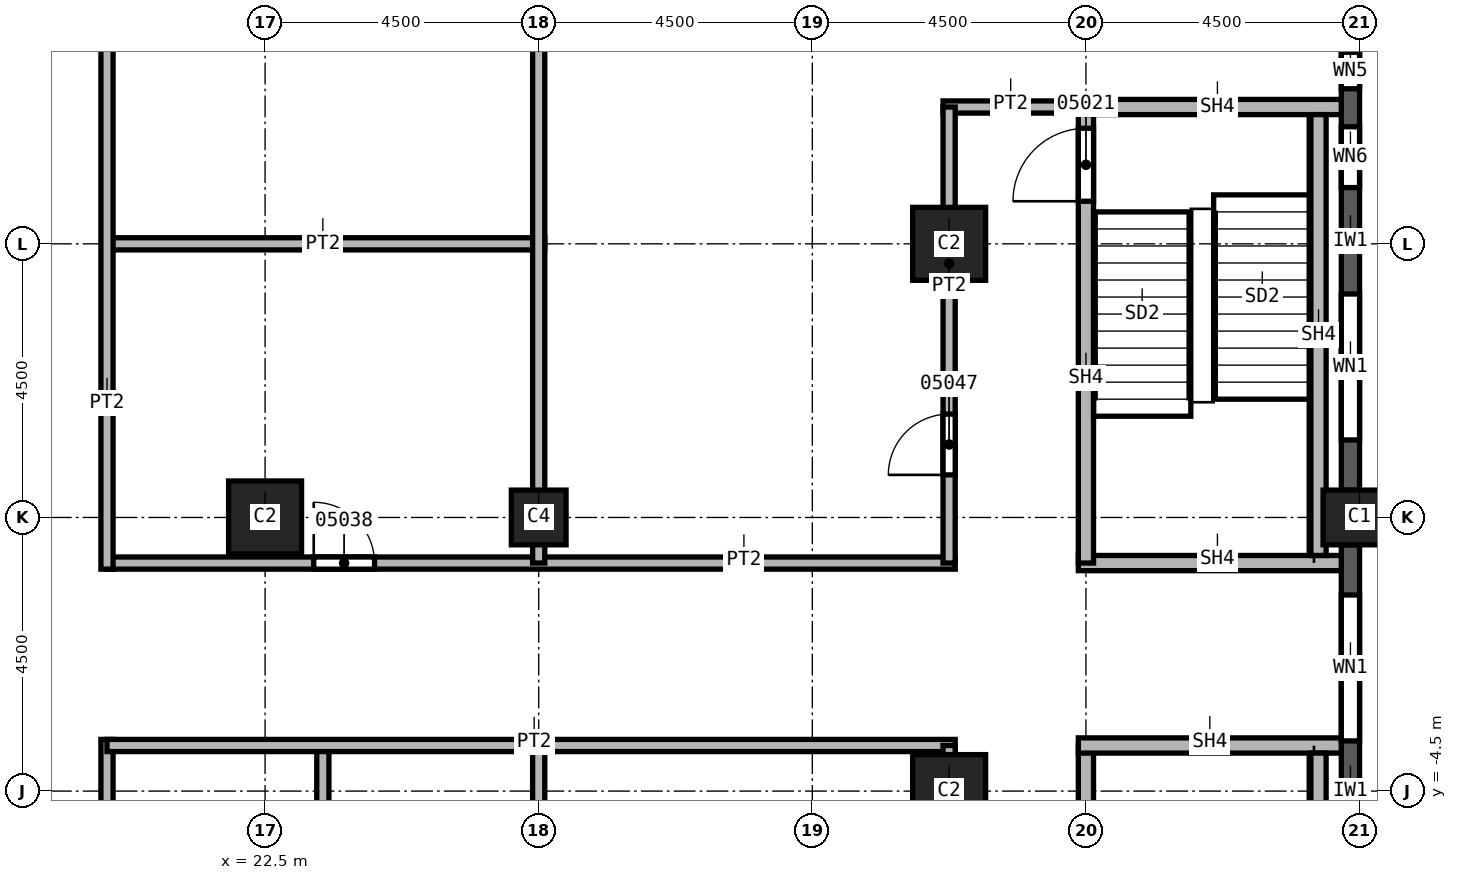
"""IFC4 building model, lengths in metres.
Left out: names, types, materials, properties, quantities, classifications, styles, units other than length and angle.
Written with IfcOpenShell. Run it as: python <this file> out.ifc"""

import sys

from ifc_helpers import new_model, si_unit, direction, frame, frame_2d, origin, origin_2d, place, context, subcontext, project, spatial, rectangle, extrude, element, fill, save


model = new_model("IFC4")
c1 = context("Model", 3, precision=1e-05, world=origin(), true_north=direction((0.0, 1.0)))
c2 = subcontext(c1, "Body", "Model", "MODEL_VIEW")
j1 = project(units=[si_unit("LENGTHUNIT", "METRE"), si_unit("PLANEANGLEUNIT", "RADIAN")], contexts=[c1])
p1 = place(None, origin())
s1 = spatial("IfcSite", under=j1, at=p1, CompositionType="ELEMENT")
p2 = place(p1, origin())
s2 = spatial("IfcBuilding", under=s1, at=p2, CompositionType="ELEMENT")
p3 = place(p2, frame((0.0, 0.0, 116.0)))
s3 = spatial("IfcBuildingStorey", under=s2, at=p3, CompositionType="ELEMENT", Elevation=116.0)
p4 = place(p3, frame((40.5, 0.0, 0.0), z_axis=(0.0, 0.0, 1.0), x_axis=(0.0, 1.0, 0.0)))
e1 = element("IfcColumn", 1, at=p4, inside=s3, PredefinedType="COLUMN", context=c2, shape_type="SweptSolid", body=[
    extrude(rectangle(XDim=0.9, YDim=1.2, at=origin_2d()), origin(), (0.0, 0.0, 1.0), 3.6),
])
for number, where, z_axis, x_axis in (
    (2, (33.75, 4.5, 0.0), (0.0, 0.0, 1.0), (1.0, 0.0, 0.0)),
    (3, (33.75, -4.5, 0.0), (0.0, 0.0, 1.0), (1.0, 0.0, 0.0)),
    (4, (22.5, 0.0, 0.0), (0.0, 0.0, 1.0), (1.0, 0.0, 0.0)),
):
    element("IfcColumn", number, at=place(p3, frame(where, z_axis=z_axis, x_axis=x_axis)), inside=s3, PredefinedType="COLUMN", context=c2, shape_type="SweptSolid", body=[
        extrude(rectangle(XDim=1.2, YDim=1.2, at=origin_2d()), origin(), (0.0, 0.0, 1.0), 3.6),
    ])
p5 = place(p3, frame((27.0, 0.0, 0.0), z_axis=(0.0, 0.0, 1.0), x_axis=(1.0, 0.0, 0.0)))
e5 = element("IfcColumn", 5, at=p5, inside=s3, PredefinedType="COLUMN", context=c2, shape_type="SweptSolid", body=[
    extrude(rectangle(XDim=0.9, YDim=0.9, at=origin_2d()), origin(), (0.0, 0.0, 1.0), 3.6),
])
p6 = place(p3, frame((40.35, -8.55, 0.0), z_axis=(0.0, 0.0, 1.0), x_axis=(0.0, 1.0, 0.0)))
e6 = element("IfcWall", 6, at=p6, inside=s3, PredefinedType="SOLIDWALL", context=c2, shape_type="SweptSolid", body=[
    extrude(rectangle(XDim=8.1, YDim=0.3, at=frame_2d((4.05, 0.0))), origin(), (0.0, 0.0, 1.0), 3.0),
])
p7 = place(p6, frame((0.825, 0.0, 0.8)))
e7 = element("IfcOpeningElement", 7, at=p7, cuts=e6, PredefinedType="OPENING", context=c2, shape_type="SweptSolid", body=[
    extrude(rectangle(XDim=2.4, YDim=1.95, at=frame_2d((1.2, 0.975))), frame((0.0, 0.15, 0.0), z_axis=(0.0, -1.0, 0.0), x_axis=(1.0, 0.0, 0.0)), (0.0, 0.0, 1.0), 0.3),
])
p8 = place(p6, frame((4.875, 0.0, 0.8)))
e8 = element("IfcOpeningElement", 8, at=p8, cuts=e6, PredefinedType="OPENING", context=c2, shape_type="SweptSolid", body=[
    extrude(rectangle(XDim=2.4, YDim=1.95, at=frame_2d((1.2, 0.975))), frame((0.0, 0.15, 0.0), z_axis=(0.0, -1.0, 0.0), x_axis=(1.0, 0.0, 0.0)), (0.0, 0.0, 1.0), 0.3),
])
p9 = place(p3, frame((40.35, 0.45, 0.0), z_axis=(0.0, 0.0, 1.0), x_axis=(0.0, 1.0, 0.0)))
e9 = element("IfcWall", 9, at=p9, inside=s3, PredefinedType="SOLIDWALL", context=c2, shape_type="SweptSolid", body=[
    extrude(rectangle(XDim=8.1, YDim=0.3, at=frame_2d((4.05, 0.0))), origin(), (0.0, 0.0, 1.0), 3.0),
])
p10 = place(p9, frame((0.825, 0.0, 0.8)))
e10 = element("IfcOpeningElement", 10, at=p10, cuts=e9, PredefinedType="OPENING", context=c2, shape_type="SweptSolid", body=[
    extrude(rectangle(XDim=2.4, YDim=1.95, at=frame_2d((1.2, 0.975))), frame((0.0, 0.15, 0.0), z_axis=(0.0, -1.0, 0.0), x_axis=(1.0, 0.0, 0.0)), (0.0, 0.0, 1.0), 0.3),
])
p11 = place(p9, frame((4.975, 0.0, 0.8)))
e11 = element("IfcOpeningElement", 11, at=p11, cuts=e9, PredefinedType="OPENING", context=c2, shape_type="SweptSolid", body=[
    extrude(rectangle(XDim=1.0, YDim=1.95, at=frame_2d((0.5, 0.975))), frame((0.0, 0.15, 0.0), z_axis=(0.0, -1.0, 0.0), x_axis=(1.0, 0.0, 0.0)), (0.0, 0.0, 1.0), 0.3),
])
p12 = place(p9, frame((6.6, 0.0, 0.8)))
e12 = element("IfcOpeningElement", 12, at=p12, cuts=e9, PredefinedType="OPENING", context=c2, shape_type="SweptSolid", body=[
    extrude(rectangle(XDim=0.6, YDim=1.95, at=frame_2d((0.3, 0.975))), frame((0.0, 0.15, 0.0), z_axis=(0.0, -1.0, 0.0), x_axis=(1.0, 0.0, 0.0)), (0.0, 0.0, 1.0), 0.3),
])
p13 = place(p3, frame((19.9, -3.65, 0.0), z_axis=(0.0, 0.0, 1.0), x_axis=(0.0, -1.0, 0.0)))
e13 = element("IfcWall", 13, at=p13, inside=s3, PredefinedType="PARTITIONING", context=c2, shape_type="SweptSolid", body=[
    extrude(rectangle(XDim=20.85, YDim=0.2, at=frame_2d((10.425, 0.0))), origin(), (0.0, 0.0, 1.0), 3.6),
])
p14 = place(p13, frame((17.5, 0.0, 0.0)))
e14 = element("IfcOpeningElement", 14, at=p14, cuts=e13, PredefinedType="OPENING", context=c2, shape_type="SweptSolid", body=[
    extrude(rectangle(XDim=1.0, YDim=2.1, at=frame_2d((0.5, 1.05))), frame((0.0, 0.1, 0.0), z_axis=(0.0, -1.0, 0.0), x_axis=(1.0, 0.0, 0.0)), (0.0, 0.0, 1.0), 0.2),
])
p15 = place(p13, frame((6.25, 0.0, 0.0)))
e15 = element("IfcOpeningElement", 15, at=p15, cuts=e13, PredefinedType="OPENING", context=c2, shape_type="SweptSolid", body=[
    extrude(rectangle(XDim=1.0, YDim=2.1, at=frame_2d((0.5, 1.05))), frame((0.0, 0.1, 0.0), z_axis=(0.0, -1.0, 0.0), x_axis=(1.0, 0.0, 0.0)), (0.0, 0.0, 1.0), 0.2),
])
p16 = place(p3, frame((19.9, -0.75, 0.0), z_axis=(0.0, 0.0, 1.0), x_axis=(1.0, 0.0, 0.0)))
e16 = element("IfcWall", 16, at=p16, inside=s3, PredefinedType="PARTITIONING", context=c2, shape_type="SweptSolid", body=[
    extrude(rectangle(XDim=13.95, YDim=0.2, at=frame_2d((6.975, 0.0))), origin(), (0.0, 0.0, 1.0), 3.6),
])
p17 = place(p16, frame((3.4, 0.0, 0.0)))
e17 = element("IfcOpeningElement", 17, at=p17, cuts=e16, PredefinedType="OPENING", context=c2, shape_type="SweptSolid", body=[
    extrude(rectangle(XDim=1.0, YDim=2.1, at=frame_2d((0.5, 1.05))), frame((0.0, 0.1, 0.0), z_axis=(0.0, -1.0, 0.0), x_axis=(1.0, 0.0, 0.0)), (0.0, 0.0, 1.0), 0.2),
])
p18 = place(p3, frame((19.9, 4.5, 0.0), z_axis=(0.0, 0.0, 1.0), x_axis=(1.0, 0.0, 0.0)))
e18 = element("IfcWall", 18, at=p18, inside=s3, PredefinedType="PARTITIONING", context=c2, shape_type="SweptSolid", body=[
    extrude(rectangle(XDim=7.2, YDim=0.2, at=frame_2d((3.6, 0.0))), origin(), (0.0, 0.0, 1.0), 3.6),
])
p19 = place(p3, frame((19.9, 24.5, 0.0), z_axis=(0.0, 0.0, 1.0), x_axis=(0.0, -1.0, 0.0)))
e19 = element("IfcWall", 19, at=p19, inside=s3, PredefinedType="PARTITIONING", context=c2, shape_type="SweptSolid", body=[
    extrude(rectangle(XDim=25.35, YDim=0.2, at=frame_2d((12.675, 0.0))), origin(), (0.0, 0.0, 1.0), 3.6),
])
p20 = place(p19, frame((15.2, 0.0, 0.0)))
e20 = element("IfcOpeningElement", 20, at=p20, cuts=e19, PredefinedType="OPENING", context=c2, shape_type="SweptSolid", body=[
    extrude(rectangle(XDim=1.0, YDim=2.1, at=frame_2d((0.5, 1.05))), frame((0.0, 0.1, 0.0), z_axis=(0.0, -1.0, 0.0), x_axis=(1.0, 0.0, 0.0)), (0.0, 0.0, 1.0), 0.2),
])
p21 = place(p19, frame((7.55, 0.0, 0.0)))
e21 = element("IfcOpeningElement", 21, at=p21, cuts=e19, PredefinedType="OPENING", context=c2, shape_type="SweptSolid", body=[
    extrude(rectangle(XDim=1.0, YDim=2.1, at=frame_2d((0.5, 1.05))), frame((0.0, 0.1, 0.0), z_axis=(0.0, -1.0, 0.0), x_axis=(1.0, 0.0, 0.0)), (0.0, 0.0, 1.0), 0.2),
])
p22 = place(p19, frame((0.55, 0.0, 0.0)))
e22 = element("IfcOpeningElement", 22, at=p22, cuts=e19, PredefinedType="OPENING", context=c2, shape_type="SweptSolid", body=[
    extrude(rectangle(XDim=1.0, YDim=2.1, at=frame_2d((0.5, 1.05))), frame((0.0, 0.1, 0.0), z_axis=(0.0, -1.0, 0.0), x_axis=(1.0, 0.0, 0.0)), (0.0, 0.0, 1.0), 0.2),
])
p23 = place(p3, frame((23.45, -3.75, 0.0), z_axis=(0.0, 0.0, 1.0), x_axis=(0.0, -1.0, 0.0)))
e23 = element("IfcWall", 23, at=p23, inside=s3, PredefinedType="PARTITIONING", context=c2, shape_type="SweptSolid", body=[
    extrude(rectangle(XDim=9.75, YDim=0.2, at=frame_2d((4.875, 0.0))), origin(), (0.0, 0.0, 1.0), 3.6),
])
p24 = place(p23, frame((6.1, 0.0, 0.0)))
e24 = element("IfcOpeningElement", 24, at=p24, cuts=e23, PredefinedType="OPENING", context=c2, shape_type="SweptSolid", body=[
    extrude(rectangle(XDim=1.0, YDim=2.1, at=frame_2d((0.5, 1.05))), frame((0.0, 0.1, 0.0), z_axis=(0.0, -1.0, 0.0), x_axis=(1.0, 0.0, 0.0)), (0.0, 0.0, 1.0), 0.2),
])
p25 = place(p3, frame((33.85, -3.75, 0.0), z_axis=(0.0, 0.0, 1.0), x_axis=(-1.0, 0.0, 0.0)))
e25 = element("IfcWall", 25, at=p25, inside=s3, PredefinedType="PARTITIONING", context=c2, shape_type="SweptSolid", body=[
    extrude(rectangle(XDim=13.95, YDim=0.2, at=frame_2d((6.975, 0.0))), origin(), (0.0, 0.0, 1.0), 3.6),
])
p26 = place(p3, frame((27.0, -3.75, 0.0), z_axis=(0.0, 0.0, 1.0), x_axis=(0.0, -1.0, 0.0)))
e26 = element("IfcWall", 26, at=p26, inside=s3, PredefinedType="PARTITIONING", context=c2, shape_type="SweptSolid", body=[
    extrude(rectangle(XDim=13.65, YDim=0.2, at=frame_2d((6.825, 0.0))), origin(), (0.0, 0.0, 1.0), 3.6),
])
p27 = place(p3, frame((27.0, 17.4, 0.0), z_axis=(0.0, 0.0, 1.0), x_axis=(0.0, -1.0, 0.0)))
e27 = element("IfcWall", 27, at=p27, inside=s3, PredefinedType="PARTITIONING", context=c2, shape_type="SweptSolid", body=[
    extrude(rectangle(XDim=18.15, YDim=0.2, at=frame_2d((9.075, 0.0))), origin(), (0.0, 0.0, 1.0), 3.6),
])
p28 = place(p3, frame((33.65, 6.75, 0.0), z_axis=(0.0, 0.0, 1.0), x_axis=(1.0, 0.0, 0.0)))
e28 = element("IfcWall", 28, at=p28, inside=s3, PredefinedType="PARTITIONING", context=c2, shape_type="SweptSolid", body=[
    extrude(rectangle(XDim=2.35, YDim=0.2, at=frame_2d((1.175, 0.0))), origin(), (0.0, 0.0, 1.0), 3.6),
])
p29 = place(p3, frame((33.75, -11.25, 0.0), z_axis=(0.0, 0.0, 1.0), x_axis=(0.0, 1.0, 0.0)))
e29 = element("IfcWall", 29, at=p29, inside=s3, PredefinedType="PARTITIONING", context=c2, shape_type="SweptSolid", body=[
    extrude(rectangle(XDim=7.5, YDim=0.2, at=frame_2d((3.75, 0.0))), origin(), (0.0, 0.0, 1.0), 3.6),
])
p30 = place(p29, frame((0.55, 0.0, 0.0)))
e30 = element("IfcOpeningElement", 30, at=p30, cuts=e29, PredefinedType="OPENING", context=c2, shape_type="SweptSolid", body=[
    extrude(rectangle(XDim=1.0, YDim=2.1, at=frame_2d((0.5, 1.05))), frame((0.0, 0.1, 0.0), z_axis=(0.0, -1.0, 0.0), x_axis=(1.0, 0.0, 0.0)), (0.0, 0.0, 1.0), 0.2),
])
p31 = place(p3, frame((33.75, -0.75, 0.0), z_axis=(0.0, 0.0, 1.0), x_axis=(0.0, 1.0, 0.0)))
e31 = element("IfcWall", 31, at=p31, inside=s3, PredefinedType="PARTITIONING", context=c2, shape_type="SweptSolid", body=[
    extrude(rectangle(XDim=7.5, YDim=0.2, at=frame_2d((3.75, 0.0))), origin(), (0.0, 0.0, 1.0), 3.6),
])
p32 = place(p31, frame((1.45, 0.0, 0.0)))
e32 = element("IfcOpeningElement", 32, at=p32, cuts=e31, PredefinedType="OPENING", context=c2, shape_type="SweptSolid", body=[
    extrude(rectangle(XDim=1.0, YDim=2.1, at=frame_2d((0.5, 1.05))), frame((0.0, 0.1, 0.0), z_axis=(0.0, -1.0, 0.0), x_axis=(1.0, 0.0, 0.0)), (0.0, 0.0, 1.0), 0.2),
])
p33 = place(p3, frame((35.875, -0.75, 0.0), z_axis=(0.0, 0.0, 1.0), x_axis=(1.0, 0.0, 0.0)))
e33 = element("IfcWall", 33, at=p33, inside=s3, PredefinedType="SOLIDWALL", context=c2, shape_type="SweptSolid", body=[
    extrude(rectangle(XDim=4.325, YDim=0.25, at=frame_2d((2.163, 0.0))), origin(), (0.0, 0.0, 1.0), 3.6),
])
p34 = place(p3, frame((36.0, -11.375, 0.0), z_axis=(0.0, 0.0, 1.0), x_axis=(0.0, 1.0, 0.0)))
e34 = element("IfcWall", 34, at=p34, inside=s3, PredefinedType="SOLIDWALL", context=c2, shape_type="SweptSolid", body=[
    extrude(rectangle(XDim=7.625, YDim=0.25, at=frame_2d((3.812, 0.0))), origin(), (0.0, 0.0, 1.0), 3.6),
])
p35 = place(p34, frame((0.4, 0.0, 0.0)))
e35 = element("IfcOpeningElement", 35, at=p35, cuts=e34, PredefinedType="OPENING", context=c2, shape_type="SweptSolid", body=[
    extrude(rectangle(XDim=1.2, YDim=2.1, at=frame_2d((0.6, 1.05))), frame((0.0, 0.125, 0.0), z_axis=(0.0, -1.0, 0.0), x_axis=(1.0, 0.0, 0.0)), (0.0, 0.0, 1.0), 0.25),
])
p36 = place(p3, frame((36.0, -0.75, 0.0), z_axis=(0.0, 0.0, 1.0), x_axis=(0.0, 1.0, 0.0)))
e36 = element("IfcWall", 36, at=p36, inside=s3, PredefinedType="SOLIDWALL", context=c2, shape_type="SweptSolid", body=[
    extrude(rectangle(XDim=7.625, YDim=0.25, at=frame_2d((3.812, 0.0))), origin(), (0.0, 0.0, 1.0), 3.6),
])
p37 = place(p36, frame((5.95, 0.0, 0.0)))
e37 = element("IfcOpeningElement", 37, at=p37, cuts=e36, PredefinedType="OPENING", context=c2, shape_type="SweptSolid", body=[
    extrude(rectangle(XDim=1.2, YDim=2.1, at=frame_2d((0.6, 1.05))), frame((0.0, 0.125, 0.0), z_axis=(0.0, -1.0, 0.0), x_axis=(1.0, 0.0, 0.0)), (0.0, 0.0, 1.0), 0.25),
])
p38 = place(p3, frame((36.0, 6.75, 0.0), z_axis=(0.0, 0.0, 1.0), x_axis=(1.0, 0.0, 0.0)))
e38 = element("IfcWall", 38, at=p38, inside=s3, PredefinedType="SOLIDWALL", context=c2, shape_type="SweptSolid", body=[
    extrude(rectangle(XDim=4.2, YDim=0.25, at=frame_2d((2.1, 0.0))), origin(), (0.0, 0.0, 1.0), 3.6),
])
p39 = place(p3, frame((40.2, -3.75, 0.0), z_axis=(0.0, 0.0, 1.0), x_axis=(-1.0, 0.0, 0.0)))
e39 = element("IfcWall", 39, at=p39, inside=s3, PredefinedType="SOLIDWALL", context=c2, shape_type="SweptSolid", body=[
    extrude(rectangle(XDim=4.325, YDim=0.25, at=frame_2d((2.163, 0.0))), origin(), (0.0, 0.0, 1.0), 3.6),
])
for number, where, z_axis, x_axis in (
    (40, (39.825, -11.125, 0.0), (0.0, 0.0, 1.0), (0.0, 1.0, 0.0)),
    (41, (39.825, -0.625, 0.0), (0.0, 0.0, 1.0), (0.0, 1.0, 0.0)),
):
    element("IfcWall", number, at=place(p3, frame(where, z_axis=z_axis, x_axis=x_axis)), inside=s3, PredefinedType="SOLIDWALL", context=c2, shape_type="SweptSolid", body=[
        extrude(rectangle(XDim=7.25, YDim=0.25, at=frame_2d((3.625, 0.0))), origin(), (0.0, 0.0, 1.0), 3.6),
    ])
p40 = place(p8, origin())
e42 = element("IfcWindow", 42, at=p40, inside=s3, PartitioningType="SINGLE_PANEL", PredefinedType="WINDOW", context=c2, shape_type="SweptSolid", body=[
    extrude(rectangle(XDim=2.4, YDim=1.95, at=frame_2d((1.2, 0.975))), frame((0.0, 0.03, 0.0), z_axis=(0.0, -1.0, 0.0), x_axis=(1.0, 0.0, 0.0)), (0.0, 0.0, 1.0), 0.06),
])
fill(e8, e42)
p41 = place(p10, origin())
e43 = element("IfcWindow", 43, at=p41, inside=s3, PartitioningType="SINGLE_PANEL", PredefinedType="WINDOW", context=c2, shape_type="SweptSolid", body=[
    extrude(rectangle(XDim=2.4, YDim=1.95, at=frame_2d((1.2, 0.975))), frame((0.0, 0.03, 0.0), z_axis=(0.0, -1.0, 0.0), x_axis=(1.0, 0.0, 0.0)), (0.0, 0.0, 1.0), 0.06),
])
fill(e10, e43)
p42 = place(p37, origin())
e44 = element("IfcDoor", 44, at=p42, inside=s3, OperationType="SINGLE_SWING_RIGHT", PredefinedType="DOOR", context=c2, shape_type="SweptSolid", body=[
    extrude(rectangle(XDim=1.2, YDim=2.1, at=frame_2d((0.6, 1.05))), frame((0.0, 0.025, 0.0), z_axis=(0.0, -1.0, 0.0), x_axis=(1.0, 0.0, 0.0)), (0.0, 0.0, 1.0), 0.05),
])
fill(e37, e44)
p43 = place(p17, origin())
e45 = element("IfcDoor", 45, at=p43, inside=s3, OperationType="SINGLE_SWING_LEFT", PredefinedType="DOOR", context=c2, shape_type="SweptSolid", body=[
    extrude(rectangle(XDim=1.0, YDim=2.1, at=frame_2d((0.5, 1.05))), frame((0.0, 0.025, 0.0), z_axis=(0.0, -1.0, 0.0), x_axis=(1.0, 0.0, 0.0)), (0.0, 0.0, 1.0), 0.05),
])
fill(e17, e45)
p44 = place(p32, origin())
e46 = element("IfcDoor", 46, at=p44, inside=s3, OperationType="SINGLE_SWING_RIGHT", PredefinedType="DOOR", context=c2, shape_type="SweptSolid", body=[
    extrude(rectangle(XDim=1.0, YDim=2.1, at=frame_2d((0.5, 1.05))), frame((0.0, 0.025, 0.0), z_axis=(0.0, -1.0, 0.0), x_axis=(1.0, 0.0, 0.0)), (0.0, 0.0, 1.0), 0.05),
])
fill(e32, e46)
p45 = place(p11, origin())
e47 = element("IfcWindow", 47, at=p45, inside=s3, PartitioningType="SINGLE_PANEL", PredefinedType="WINDOW", context=c2, shape_type="SweptSolid", body=[
    extrude(rectangle(XDim=1.0, YDim=1.95, at=frame_2d((0.5, 0.975))), frame((0.0, 0.03, 0.0), z_axis=(0.0, -1.0, 0.0), x_axis=(1.0, 0.0, 0.0)), (0.0, 0.0, 1.0), 0.06),
])
fill(e11, e47)
p46 = place(p12, origin())
e48 = element("IfcWindow", 48, at=p46, inside=s3, PartitioningType="SINGLE_PANEL", PredefinedType="WINDOW", context=c2, shape_type="SweptSolid", body=[
    extrude(rectangle(XDim=0.6, YDim=1.95, at=frame_2d((0.3, 0.975))), frame((0.0, 0.03, 0.0), z_axis=(0.0, -1.0, 0.0), x_axis=(1.0, 0.0, 0.0)), (0.0, 0.0, 1.0), 0.06),
])
fill(e12, e48)
save(model, sys.argv[1])
